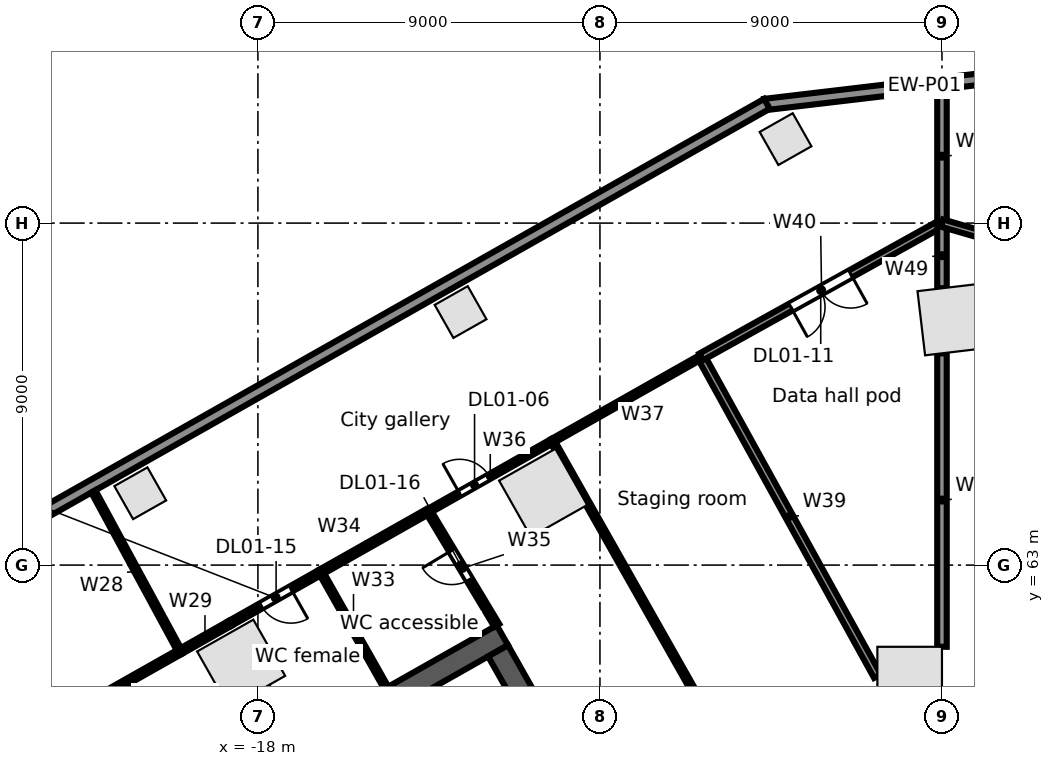
"""IFC4 building model, lengths in metres.
Left out: names, types, materials, properties, quantities, classifications, styles, units other than length and angle.
Written with IfcOpenShell. Run it as: python <this file> out.ifc"""

import sys

from ifc_helpers import new_model, si_unit, direction, frame, frame_2d, origin, origin_2d, place, context, subcontext, project, spatial, rectangle, extrude, element, fill, save


model = new_model("IFC4")
c1 = context("Model", 3, precision=1e-05, world=origin(), true_north=direction((0.0, 1.0)))
c2 = subcontext(c1, "Body", "Model", "MODEL_VIEW")
j1 = project(units=[si_unit("LENGTHUNIT", "METRE"), si_unit("PLANEANGLEUNIT", "RADIAN")], contexts=[c1])
p1 = place(None, origin())
s1 = spatial("IfcSite", under=j1, at=p1, CompositionType="ELEMENT")
p2 = place(p1, origin())
s2 = spatial("IfcBuilding", under=s1, at=p2, CompositionType="ELEMENT")
p3 = place(p2, frame((0.0, 0.0, 6.5)))
s3 = spatial("IfcBuildingStorey", under=s2, at=p3, CompositionType="ELEMENT", Elevation=6.5)
for number, where, z_axis, x_axis in (
    (1, (0.3, 69.464, 0.0), (0.0, 0.0, 1.0), (-0.993, -0.118, 0.0)),
    (2, (-10.495, 64.902, 0.0), (0.0, 0.0, 1.0), (-0.87, -0.492, 0.0)),
    (3, (-18.441, 60.406, 0.0), (0.0, 0.0, 1.0), (-0.87, -0.492, 0.0)),
    (4, (-0.85, 60.0, 0.0), (0.0, 0.0, 1.0), (0.0, 1.0, 0.0)),
):
    element("IfcColumn", number, at=place(p3, frame(where, z_axis=z_axis, x_axis=x_axis)), inside=s3, PredefinedType="COLUMN", context=c2, shape_type="SweptSolid", body=[
        extrude(rectangle(XDim=1.7, YDim=1.7, at=origin_2d()), origin(), (0.0, 0.0, 1.0), 5.0),
    ])
for number, where, z_axis, x_axis in (
    (5, (-4.116, 74.21, 0.0), (0.0, 0.0, 1.0), (-0.87, -0.492, 0.0)),
    (6, (-12.667, 69.659, 0.0), (0.0, 0.0, 1.0), (-0.87, -0.492, 0.0)),
    (7, (-21.096, 64.89, 0.0), (0.0, 0.0, 1.0), (-0.87, -0.492, 0.0)),
):
    element("IfcColumn", number, at=place(p3, frame(where, z_axis=z_axis, x_axis=x_axis)), inside=s3, PredefinedType="COLUMN", context=c2, shape_type="SweptSolid", body=[
        extrude(rectangle(XDim=1.0, YDim=1.0, at=origin_2d()), origin(), (0.0, 0.0, 1.0), 5.0),
    ])
p4 = place(p3, frame((-4.663, 75.12, 0.0), z_axis=(0.0, 0.0, 1.0), x_axis=(0.993069631717, 0.11752747152, 0.0)))
e8 = element("IfcWall", 8, at=p4, inside=s3, PredefinedType="STANDARD", context=c2, shape_type="SweptSolid", body=[
    extrude(rectangle(XDim=8.463, YDim=0.3, at=frame_2d((4.231, 0.0))), origin(), (0.0, 0.0, 1.0), 4.65),
])
p5 = place(p3, frame((-63.707, 41.701, 0.0), z_axis=(0.0, 0.0, 1.0), x_axis=(0.870355510268, 0.492423888277, 0.0)))
e9 = element("IfcWall", 9, at=p5, inside=s3, PredefinedType="STANDARD", context=c2, shape_type="SweptSolid", body=[
    extrude(rectangle(XDim=67.903, YDim=0.3, at=frame_2d((33.952, 0.0))), origin(), (0.0, 0.0, 1.0), 4.65),
])
p6 = place(p3, frame((-24.623, 53.767, 0.0), z_axis=(0.0, 0.0, 1.0), x_axis=(0.870356627484, 0.492421913601, 0.0)))
e10 = element("IfcWall", 10, at=p6, inside=s3, PredefinedType="SOLIDWALL", context=c2, shape_type="SweptSolid", body=[
    extrude(rectangle(XDim=15.0, YDim=0.6, at=frame_2d((7.5, 0.0))), origin(), (0.0, 0.0, 1.0), 4.65),
])
p7 = place(p3, frame((-11.681, 60.744, 0.0), z_axis=(0.0, 0.0, 1.0), x_axis=(0.492426772896, -0.870353878221, 0.0)))
e11 = element("IfcWall", 11, at=p7, inside=s3, PredefinedType="SOLIDWALL", context=c2, shape_type="SweptSolid", body=[
    extrude(rectangle(XDim=12.8, YDim=0.6, at=frame_2d((6.4, 0.0))), origin(), (0.0, 0.0, 1.0), 4.65),
])
p8 = place(p3, frame((-24.18, 58.384, 0.0), z_axis=(0.0, 0.0, 1.0), x_axis=(0.870360772617, 0.492414587, 0.0)))
e12 = element("IfcWall", 12, at=p8, inside=s3, PredefinedType="PARTITIONING", context=c2, shape_type="SweptSolid", body=[
    extrude(rectangle(XDim=4.75, YDim=0.15, at=frame_2d((2.375, 0.0))), origin(), (0.0, 0.0, 1.0), 4.65),
])
p9 = place(p8, frame((1.95, 0.0, 0.0)))
e13 = element("IfcOpeningElement", 13, at=p9, cuts=e12, PredefinedType="OPENING", context=c2, shape_type="SweptSolid", body=[
    extrude(rectangle(XDim=0.9, YDim=2.1, at=frame_2d((0.45, 1.05))), frame((0.0, 0.085, 0.0), z_axis=(0.0, -1.0, 0.0), x_axis=(1.0, 0.0, 0.0)), (0.0, 0.0, 1.0), 0.17),
])
p10 = place(p3, frame((-22.33, 64.939, 0.0), z_axis=(0.0, 0.0, 1.0), x_axis=(0.476360236723, -0.879250206067, 0.0)))
e14 = element("IfcWall", 14, at=p10, inside=s3, PredefinedType="PARTITIONING", context=c2, shape_type="SweptSolid", body=[
    extrude(rectangle(XDim=4.795, YDim=0.125, at=frame_2d((2.397, 0.0))), origin(), (0.0, 0.0, 1.0), 3.93),
])
p11 = place(p3, frame((-20.046, 60.723, 0.0), z_axis=(0.0, 0.0, 1.0), x_axis=(0.870308175411, 0.492507542899, 0.0)))
e15 = element("IfcWall", 15, at=p11, inside=s3, PredefinedType="PARTITIONING", context=c2, shape_type="SweptSolid", body=[
    extrude(rectangle(XDim=1.5, YDim=0.15, at=frame_2d((0.75, 0.0))), origin(), (0.0, 0.0, 1.0), 3.93),
])
p12 = place(p3, frame((-18.74, 61.462, 0.0), z_axis=(0.0, 0.0, 1.0), x_axis=(0.870430549821, 0.492291232848, 0.0)))
e16 = element("IfcWall", 16, at=p12, inside=s3, PredefinedType="PARTITIONING", context=c2, shape_type="SweptSolid", body=[
    extrude(rectangle(XDim=2.75, YDim=0.15, at=frame_2d((1.375, 0.0))), origin(), (0.0, 0.0, 1.0), 4.65),
])
p13 = place(p12, frame((0.95, 0.0, 0.0)))
e17 = element("IfcOpeningElement", 17, at=p13, cuts=e16, PredefinedType="OPENING", context=c2, shape_type="SweptSolid", body=[
    extrude(rectangle(XDim=0.9, YDim=2.1, at=frame_2d((0.45, 1.05))), frame((0.0, 0.085, 0.0), z_axis=(0.0, -1.0, 0.0), x_axis=(1.0, 0.0, 0.0)), (0.0, 0.0, 1.0), 0.17),
])
p14 = place(p3, frame((-17.797, 59.794, 0.0), z_axis=(0.0, 0.0, 1.0), x_axis=(0.492366981934, -0.870387703901, 0.0)))
e18 = element("IfcWall", 18, at=p14, inside=s3, PredefinedType="PARTITIONING", context=c2, shape_type="SweptSolid", body=[
    extrude(rectangle(XDim=1.584, YDim=0.125, at=frame_2d((0.792, 0.0))), origin(), (0.0, 0.0, 1.0), 4.65),
])
p15 = place(p3, frame((-16.346, 62.816, 0.0), z_axis=(0.0, 0.0, 1.0), x_axis=(0.492220429283, -0.870470590541, 0.0)))
e19 = element("IfcWall", 19, at=p15, inside=s3, PredefinedType="PARTITIONING", context=c2, shape_type="SweptSolid", body=[
    extrude(rectangle(XDim=3.5, YDim=0.125, at=frame_2d((1.75, 0.0))), origin(), (0.0, 0.0, 1.0), 3.93),
])
p16 = place(p3, frame((-16.346, 62.816, 0.0), z_axis=(0.0, 0.0, 1.0), x_axis=(0.870334637055, 0.492460779699, 0.0)))
e20 = element("IfcWall", 20, at=p16, inside=s3, PredefinedType="PARTITIONING", context=c2, shape_type="SweptSolid", body=[
    extrude(rectangle(XDim=3.249, YDim=0.15, at=frame_2d((1.625, 0.0))), origin(), (0.0, 0.0, 1.0), 4.65),
])
p17 = place(p3, frame((-13.518, 64.416, 0.0), z_axis=(0.0, 0.0, 1.0), x_axis=(0.514875058642, -0.857265229663, 0.0)))
e21 = element("IfcWall", 21, at=p17, inside=s3, PredefinedType="PARTITIONING", context=c2, shape_type="SweptSolid", body=[
    extrude(rectangle(XDim=3.502, YDim=0.15, at=frame_2d((1.751, 0.0))), origin(), (0.0, 0.0, 1.0), 3.93),
])
p18 = place(p17, frame((1.2, 0.0, 0.0)))
e22 = element("IfcOpeningElement", 22, at=p18, cuts=e21, PredefinedType="OPENING", context=c2, shape_type="SweptSolid", body=[
    extrude(rectangle(XDim=0.9, YDim=2.1, at=frame_2d((0.45, 1.05))), frame((0.0, 0.085, 0.0), z_axis=(0.0, -1.0, 0.0), x_axis=(1.0, 0.0, 0.0)), (0.0, 0.0, 1.0), 0.17),
])
p19 = place(p3, frame((-13.518, 64.416, 0.0), z_axis=(0.0, 0.0, 1.0), x_axis=(0.870338454914, 0.492454032268, 0.0)))
e23 = element("IfcWall", 23, at=p19, inside=s3, PredefinedType="PARTITIONING", context=c2, shape_type="SweptSolid", body=[
    extrude(rectangle(XDim=3.75, YDim=0.125, at=frame_2d((1.875, 0.0))), origin(), (0.0, 0.0, 1.0), 3.712),
])
p20 = place(p19, frame((0.95, 0.0, 0.0)))
e24 = element("IfcOpeningElement", 24, at=p20, cuts=e23, PredefinedType="OPENING", context=c2, shape_type="SweptSolid", body=[
    extrude(rectangle(XDim=0.9, YDim=2.1, at=frame_2d((0.45, 1.05))), frame((0.0, 0.073, 0.0), z_axis=(0.0, -1.0, 0.0), x_axis=(1.0, 0.0, 0.0)), (0.0, 0.0, 1.0), 0.145),
])
p21 = place(p3, frame((-10.254, 66.263, 0.0), z_axis=(0.0, 0.0, 1.0), x_axis=(0.870454697906, 0.492248533664, 0.0)))
e25 = element("IfcWall", 25, at=p21, inside=s3, PredefinedType="PARTITIONING", context=c2, shape_type="SweptSolid", body=[
    extrude(rectangle(XDim=4.5, YDim=0.125, at=frame_2d((2.25, 0.0))), origin(), (0.0, 0.0, 1.0), 4.65),
])
p22 = place(p3, frame((-10.254, 66.263, 0.0), z_axis=(0.0, 0.0, 1.0), x_axis=(0.492411664329, -0.870362426138, 0.0)))
e26 = element("IfcWall", 26, at=p22, inside=s3, PredefinedType="PARTITIONING", context=c2, shape_type="SweptSolid", body=[
    extrude(rectangle(XDim=17.0, YDim=0.125, at=frame_2d((8.5, 0.0))), origin(), (0.0, 0.0, 1.0), 3.712),
])
p23 = place(p22, frame((7.95, 0.0, 0.0)))
e27 = element("IfcOpeningElement", 27, at=p23, cuts=e26, PredefinedType="OPENING", context=c2, shape_type="SweptSolid", body=[
    extrude(rectangle(XDim=0.9, YDim=2.1, at=frame_2d((0.45, 1.05))), frame((0.0, 0.073, 0.0), z_axis=(0.0, -1.0, 0.0), x_axis=(1.0, 0.0, 0.0)), (0.0, 0.0, 1.0), 0.145),
])
p24 = place(p3, frame((-6.337, 68.478, 0.0), z_axis=(0.0, 0.0, 1.0), x_axis=(0.483322867171, -0.875442177456, 0.0)))
e28 = element("IfcWall", 28, at=p24, inside=s3, PredefinedType="PARTITIONING", context=c2, shape_type="SweptSolid", body=[
    extrude(rectangle(XDim=9.594, YDim=0.2, at=frame_2d((4.797, 0.0))), origin(), (0.0, 0.0, 1.0), 3.712),
])
p25 = place(p3, frame((-6.337, 68.478, 0.0), z_axis=(0.0, 0.0, 1.0), x_axis=(0.87407148623, 0.485797320864, 0.0)))
e29 = element("IfcWall", 29, at=p25, inside=s3, PredefinedType="PARTITIONING", context=c2, shape_type="SweptSolid", body=[
    extrude(rectangle(XDim=7.25, YDim=0.2, at=frame_2d((3.625, 0.0))), origin(), (0.0, 0.0, 1.0), 3.93),
])
p26 = place(p25, frame((2.7, 0.0, 0.0)))
e30 = element("IfcOpeningElement", 30, at=p26, cuts=e29, PredefinedType="OPENING", context=c2, shape_type="SweptSolid", body=[
    extrude(rectangle(XDim=1.8, YDim=2.1, at=frame_2d((0.9, 1.05))), frame((0.0, 0.11, 0.0), z_axis=(0.0, -1.0, 0.0), x_axis=(1.0, 0.0, 0.0)), (0.0, 0.0, 1.0), 0.22),
])
p27 = place(p3, frame((0.0, 60.85, 0.0), z_axis=(0.0, 0.0, 1.0), x_axis=(0.0, 1.0, 0.0)))
e31 = element("IfcWall", 31, at=p27, inside=s3, PredefinedType="PARTITIONING", context=c2, shape_type="SweptSolid", body=[
    extrude(rectangle(XDim=7.723, YDim=0.25, at=frame_2d((3.861, 0.0))), origin(), (0.0, 0.0, 1.0), 3.93),
])
p28 = place(p3, frame((0.0, 70.285, 0.0), z_axis=(0.0, 0.0, 1.0), x_axis=(0.0, 1.0, 0.0)))
e32 = element("IfcWall", 32, at=p28, inside=s3, PredefinedType="PARTITIONING", context=c2, shape_type="SweptSolid", body=[
    extrude(rectangle(XDim=1.715, YDim=0.25, at=frame_2d((0.857, 0.0))), origin(), (0.0, 0.0, 1.0), 4.65),
])
p29 = place(p3, frame((0.0, 72.0, 0.0), z_axis=(0.0, 0.0, 1.0), x_axis=(0.0, 1.0, 0.0)))
e33 = element("IfcWall", 33, at=p29, inside=s3, PredefinedType="PARTITIONING", context=c2, shape_type="SweptSolid", body=[
    extrude(rectangle(XDim=3.521, YDim=0.25, at=frame_2d((1.76, 0.0))), origin(), (0.0, 0.0, 1.0), 4.024),
])
p30 = place(p3, frame((0.0, 72.0, 0.0), z_axis=(0.0, 0.0, 1.0), x_axis=(0.960375968852, -0.278707729443, 0.0)))
e34 = element("IfcWall", 34, at=p30, inside=s3, PredefinedType="PARTITIONING", context=c2, shape_type="SweptSolid", body=[
    extrude(rectangle(XDim=11.058, YDim=0.2, at=frame_2d((5.529, 0.0))), origin(), (0.0, 0.0, 1.0), 3.712),
])
p31 = place(p20, origin())
e35 = element("IfcDoor", 35, at=p31, inside=s3, OperationType="SINGLE_SWING_LEFT", PredefinedType="DOOR", context=c2, shape_type="SweptSolid", body=[
    extrude(rectangle(XDim=0.9, YDim=2.1, at=frame_2d((0.45, 1.05))), frame((0.0, 0.025, 0.0), z_axis=(0.0, -1.0, 0.0), x_axis=(1.0, 0.0, 0.0)), (0.0, 0.0, 1.0), 0.05),
])
fill(e24, e35)
p32 = place(p26, frame((1.8, 0.0, 0.0), z_axis=(0.0, 0.0, 1.0), x_axis=(-1.0, 0.0, 0.0)))
e36 = element("IfcDoor", 36, at=p32, inside=s3, OperationType="DOUBLE_DOOR_SINGLE_SWING", PredefinedType="DOOR", context=c2, shape_type="SweptSolid", body=[
    extrude(rectangle(XDim=1.8, YDim=2.1, at=frame_2d((0.9, 1.05))), frame((0.0, 0.025, 0.0), z_axis=(0.0, -1.0, 0.0), x_axis=(1.0, 0.0, 0.0)), (0.0, 0.0, 1.0), 0.05),
])
fill(e30, e36)
p33 = place(p13, frame((0.9, 0.0, 0.0), z_axis=(0.0, 0.0, 1.0), x_axis=(-1.0, 0.0, 0.0)))
e37 = element("IfcDoor", 37, at=p33, inside=s3, OperationType="SINGLE_SWING_LEFT", PredefinedType="DOOR", context=c2, shape_type="SweptSolid", body=[
    extrude(rectangle(XDim=0.9, YDim=2.1, at=frame_2d((0.45, 1.05))), frame((0.0, 0.025, 0.0), z_axis=(0.0, -1.0, 0.0), x_axis=(1.0, 0.0, 0.0)), (0.0, 0.0, 1.0), 0.05),
])
fill(e17, e37)
p34 = place(p18, frame((0.9, 0.0, 0.0), z_axis=(0.0, 0.0, 1.0), x_axis=(-1.0, 0.0, 0.0)))
e38 = element("IfcDoor", 38, at=p34, inside=s3, OperationType="SINGLE_SWING_RIGHT", PredefinedType="DOOR", context=c2, shape_type="SweptSolid", body=[
    extrude(rectangle(XDim=0.9, YDim=2.1, at=frame_2d((0.45, 1.05))), frame((0.0, 0.025, 0.0), z_axis=(0.0, -1.0, 0.0), x_axis=(1.0, 0.0, 0.0)), (0.0, 0.0, 1.0), 0.05),
])
fill(e22, e38)
save(model, sys.argv[1])
